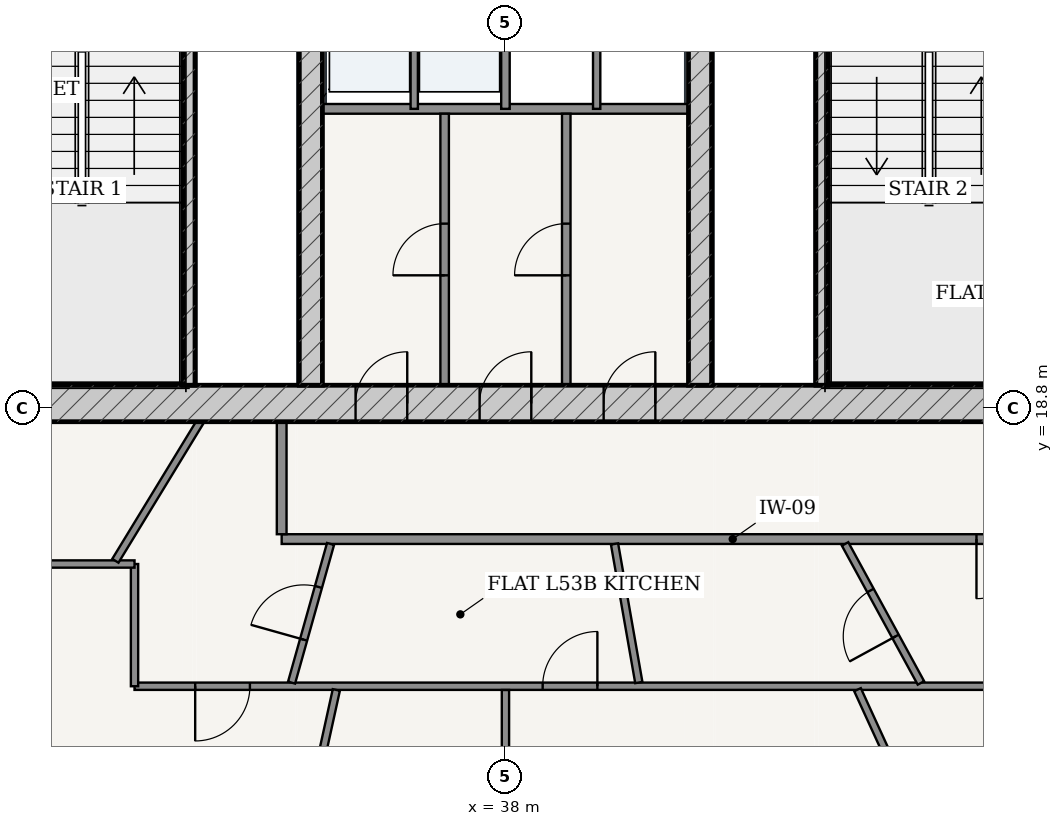
"""IFC4 building model, lengths in metres.
Left out: names, types, materials, properties, quantities, classifications, styles, units other than length and angle.
Written with IfcOpenShell. Run it as: python <this file> out.ifc"""

import sys

from ifc_helpers import new_model, si_unit, direction, frame, frame_2d, origin, place, context, subcontext, project, spatial, rectangle, extrude, source, transform, mapped, element, fill, save


model = new_model("IFC4")
c1 = context("Model", 3, precision=1e-05, world=origin(), true_north=direction((-0.2419218956, 0.970295726276)))
c2 = subcontext(c1, "Body", "Model", "MODEL_VIEW")
j1 = project(units=[si_unit("LENGTHUNIT", "METRE"), si_unit("PLANEANGLEUNIT", "RADIAN")], contexts=[c1])
p1 = place(None, origin())
s1 = spatial("IfcSite", under=j1, at=p1, CompositionType="ELEMENT")
p2 = place(p1, origin())
s2 = spatial("IfcBuilding", under=s1, at=p2, CompositionType="ELEMENT")
p3 = place(p2, frame((0.0, 0.0, 202.3)))
s3 = spatial("IfcBuildingStorey", under=s2, at=p3, CompositionType="ELEMENT", Elevation=202.3)
p4 = place(p3, frame((28.775, 18.875, 0.0), z_axis=(0.0, 0.0, 1.0), x_axis=(1.0, 0.0, 0.0)))
e1 = element("IfcWall", 1, at=p4, inside=s3, PredefinedType="SHEAR", context=c2, shape_type="SweptSolid", body=[
    extrude(rectangle(XDim=18.45, YDim=0.6, at=frame_2d((9.225, 0.0))), origin(), (0.0, 0.0, 1.0), 3.435),
])
p5 = place(p4, frame((6.76, 0.0, 0.0)))
e2 = element("IfcOpeningElement", 2, at=p5, cuts=e1, PredefinedType="OPENING", context=c2, shape_type="SweptSolid", body=[
    extrude(rectangle(XDim=0.85, YDim=2.1, at=frame_2d((0.425, 1.05))), frame((0.0, 0.31, 0.0), z_axis=(0.0, -1.0, 0.0), x_axis=(1.0, 0.0, 0.0)), (0.0, 0.0, 1.0), 0.62),
])
p6 = place(p4, frame((8.8, 0.0, 0.0)))
e3 = element("IfcOpeningElement", 3, at=p6, cuts=e1, PredefinedType="OPENING", context=c2, shape_type="SweptSolid", body=[
    extrude(rectangle(XDim=0.85, YDim=2.1, at=frame_2d((0.425, 1.05))), frame((0.0, 0.31, 0.0), z_axis=(0.0, -1.0, 0.0), x_axis=(1.0, 0.0, 0.0)), (0.0, 0.0, 1.0), 0.62),
])
p7 = place(p4, frame((10.84, 0.0, 0.0)))
e4 = element("IfcOpeningElement", 4, at=p7, cuts=e1, PredefinedType="OPENING", context=c2, shape_type="SweptSolid", body=[
    extrude(rectangle(XDim=0.85, YDim=2.1, at=frame_2d((0.425, 1.05))), frame((0.0, 0.31, 0.0), z_axis=(0.0, -1.0, 0.0), x_axis=(1.0, 0.0, 0.0)), (0.0, 0.0, 1.0), 0.62),
])
for number, where, z_axis, x_axis in (
    (5, (32.795, 19.175, 0.0), (0.0, 0.0, 1.0), (0.0, 1.0, 0.0)),
    (6, (43.205, 19.175, 0.0), (0.0, 0.0, 1.0), (0.0, 1.0, 0.0)),
):
    element("IfcWall", number, at=place(p3, frame(where, z_axis=z_axis, x_axis=x_axis)), inside=s3, PredefinedType="SOLIDWALL", context=c2, shape_type="SweptSolid", body=[
        extrude(rectangle(XDim=7.375, YDim=0.2, at=frame_2d((3.688, 0.0))), origin(), (0.0, 0.0, 1.0), 3.435),
    ])
p8 = place(p3, frame((34.8, 19.175, 0.0), z_axis=(0.0, 0.0, 1.0), x_axis=(0.0, 1.0, 0.0)))
e7 = element("IfcWall", 7, at=p8, inside=s3, PredefinedType="SHEAR", context=c2, shape_type="SweptSolid", body=[
    extrude(rectangle(XDim=15.25, YDim=0.38, at=frame_2d((7.625, 0.0))), origin(), (0.0, 0.0, 1.0), 3.435),
])
p9 = place(p8, frame((7.8, 0.0, 0.0)))
e8 = element("IfcOpeningElement", 8, at=p9, cuts=e7, PredefinedType="OPENING", context=c2, shape_type="SweptSolid", body=[
    extrude(rectangle(XDim=1.05, YDim=2.15, at=frame_2d((0.525, 1.075))), frame((0.0, 0.2, 0.0), z_axis=(0.0, -1.0, 0.0), x_axis=(1.0, 0.0, 0.0)), (0.0, 0.0, 1.0), 0.4),
])
p10 = place(p3, frame((41.2, 19.175, 0.0), z_axis=(0.0, 0.0, 1.0), x_axis=(0.0, 1.0, 0.0)))
e9 = element("IfcWall", 9, at=p10, inside=s3, PredefinedType="SHEAR", context=c2, shape_type="SweptSolid", body=[
    extrude(rectangle(XDim=15.25, YDim=0.38, at=frame_2d((7.625, 0.0))), origin(), (0.0, 0.0, 1.0), 3.435),
])
p11 = place(p10, frame((7.8, 0.0, 0.0)))
e10 = element("IfcOpeningElement", 10, at=p11, cuts=e9, PredefinedType="OPENING", context=c2, shape_type="SweptSolid", body=[
    extrude(rectangle(XDim=1.05, YDim=2.15, at=frame_2d((0.525, 1.075))), frame((0.0, 0.2, 0.0), z_axis=(0.0, -1.0, 0.0), x_axis=(1.0, 0.0, 0.0)), (0.0, 0.0, 1.0), 0.4),
])
p12 = place(p3, frame((34.99, 23.72, 0.0), z_axis=(0.0, 0.0, 1.0), x_axis=(1.0, 0.0, 0.0)))
e11 = element("IfcWall", 11, at=p12, inside=s3, PredefinedType="PARTITIONING", context=c2, shape_type="SweptSolid", body=[
    extrude(rectangle(XDim=6.02, YDim=0.16, at=frame_2d((3.01, 0.0))), origin(), (0.0, 0.0, 1.0), 3.435),
])
p13 = place(p3, frame((36.5, 23.72, 0.0), z_axis=(0.0, 0.0, 1.0), x_axis=(0.0, 1.0, 0.0)))
e12 = element("IfcWall", 12, at=p13, inside=s3, PredefinedType="PARTITIONING", context=c2, shape_type="SweptSolid", body=[
    extrude(rectangle(XDim=2.56, YDim=0.12, at=frame_2d((1.28, 0.0))), origin(), (0.0, 0.0, 1.0), 3.435),
])
p14 = place(p3, frame((38.0, 23.72, 0.0), z_axis=(0.0, 0.0, 1.0), x_axis=(0.0, 1.0, 0.0)))
e13 = element("IfcWall", 13, at=p14, inside=s3, PredefinedType="PARTITIONING", context=c2, shape_type="SweptSolid", body=[
    extrude(rectangle(XDim=2.56, YDim=0.14, at=frame_2d((1.28, 0.0))), origin(), (0.0, 0.0, 1.0), 3.435),
])
p15 = place(p3, frame((39.5, 23.72, 0.0), z_axis=(0.0, 0.0, 1.0), x_axis=(0.0, 1.0, 0.0)))
e14 = element("IfcWall", 14, at=p15, inside=s3, PredefinedType="PARTITIONING", context=c2, shape_type="SweptSolid", body=[
    extrude(rectangle(XDim=2.56, YDim=0.12, at=frame_2d((1.28, 0.0))), origin(), (0.0, 0.0, 1.0), 3.435),
])
p16 = place(p3, frame((37.0, 19.175, 0.0), z_axis=(0.0, 0.0, 1.0), x_axis=(0.0, 1.0, 0.0)))
e15 = element("IfcWall", 15, at=p16, inside=s3, PredefinedType="PARTITIONING", context=c2, shape_type="SweptSolid", body=[
    extrude(rectangle(XDim=4.465, YDim=0.14, at=frame_2d((2.232, 0.0))), origin(), (0.0, 0.0, 1.0), 3.435),
])
p17 = place(p16, frame((1.808, 0.0, 0.0)))
e16 = element("IfcOpeningElement", 16, at=p17, cuts=e15, PredefinedType="OPENING", context=c2, shape_type="SweptSolid", body=[
    extrude(rectangle(XDim=0.85, YDim=2.1, at=frame_2d((0.425, 1.05))), frame((0.0, 0.08, 0.0), z_axis=(0.0, -1.0, 0.0), x_axis=(1.0, 0.0, 0.0)), (0.0, 0.0, 1.0), 0.16),
])
p18 = place(p3, frame((39.0, 19.175, 0.0), z_axis=(0.0, 0.0, 1.0), x_axis=(0.0, 1.0, 0.0)))
e17 = element("IfcWall", 17, at=p18, inside=s3, PredefinedType="PARTITIONING", context=c2, shape_type="SweptSolid", body=[
    extrude(rectangle(XDim=4.465, YDim=0.14, at=frame_2d((2.232, 0.0))), origin(), (0.0, 0.0, 1.0), 3.435),
])
p19 = place(p18, frame((1.808, 0.0, 0.0)))
e18 = element("IfcOpeningElement", 18, at=p19, cuts=e17, PredefinedType="OPENING", context=c2, shape_type="SweptSolid", body=[
    extrude(rectangle(XDim=0.85, YDim=2.1, at=frame_2d((0.425, 1.05))), frame((0.0, 0.08, 0.0), z_axis=(0.0, -1.0, 0.0), x_axis=(1.0, 0.0, 0.0)), (0.0, 0.0, 1.0), 0.16),
])
p20 = place(p3, frame((34.32, 16.645, 0.0), z_axis=(0.0, 0.0, 1.0), x_axis=(1.0, 0.0, 0.0)))
e19 = element("IfcWall", 19, at=p20, inside=s3, PredefinedType="PARTITIONING", context=c2, shape_type="SweptSolid", body=[
    extrude(rectangle(XDim=14.835, YDim=0.16, at=frame_2d((7.417, 0.0))), origin(), (0.0, 0.0, 1.0), 2.951),
])
p21 = place(p20, frame((11.426, 0.0, 0.0)))
e20 = element("IfcOpeningElement", 20, at=p21, cuts=e19, PredefinedType="OPENING", context=c2, shape_type="SweptSolid", body=[
    extrude(rectangle(XDim=0.98, YDim=2.2, at=frame_2d((0.49, 1.1))), frame((0.0, 0.09, 0.0), z_axis=(0.0, -1.0, 0.0), x_axis=(1.0, 0.0, 0.0)), (0.0, 0.0, 1.0), 0.18),
])
p22 = place(p3, frame((34.32, 16.725, 0.0), z_axis=(0.0, 0.0, 1.0), x_axis=(0.0, 1.0, 0.0)))
e21 = element("IfcWall", 21, at=p22, inside=s3, PredefinedType="PARTITIONING", context=c2, shape_type="SweptSolid", body=[
    extrude(rectangle(XDim=1.85, YDim=0.16, at=frame_2d((0.925, 0.0))), origin(), (0.0, 0.0, 1.0), 3.435),
])
p23 = place(p3, frame((51.575, 14.225, 0.0), z_axis=(0.0, 0.0, 1.0), x_axis=(-1.0, 0.0, 0.0)))
e22 = element("IfcWall", 22, at=p23, inside=s3, PredefinedType="PARTITIONING", context=c2, shape_type="SweptSolid", body=[
    extrude(rectangle(XDim=19.675, YDim=0.12, at=frame_2d((9.837, 0.0))), origin(), (0.0, 0.0, 1.0), 2.951),
])
p24 = place(p23, frame((3.083, 0.0, 0.0)))
e23 = element("IfcOpeningElement", 23, at=p24, cuts=e22, PredefinedType="OPENING", context=c2, shape_type="SweptSolid", body=[
    extrude(rectangle(XDim=0.9, YDim=2.15, at=frame_2d((0.45, 1.075))), frame((0.0, 0.07, 0.0), z_axis=(0.0, -1.0, 0.0), x_axis=(1.0, 0.0, 0.0)), (0.0, 0.0, 1.0), 0.14),
])
p25 = place(p23, frame((12.063, 0.0, 0.0)))
e24 = element("IfcOpeningElement", 24, at=p25, cuts=e22, PredefinedType="OPENING", context=c2, shape_type="SweptSolid", body=[
    extrude(rectangle(XDim=0.9, YDim=2.15, at=frame_2d((0.45, 1.075))), frame((0.0, 0.07, 0.0), z_axis=(0.0, -1.0, 0.0), x_axis=(1.0, 0.0, 0.0)), (0.0, 0.0, 1.0), 0.14),
])
p26 = place(p23, frame((17.777, 0.0, 0.0)))
e25 = element("IfcOpeningElement", 25, at=p26, cuts=e22, PredefinedType="OPENING", context=c2, shape_type="SweptSolid", body=[
    extrude(rectangle(XDim=0.9, YDim=2.15, at=frame_2d((0.45, 1.075))), frame((0.0, 0.07, 0.0), z_axis=(0.0, -1.0, 0.0), x_axis=(1.0, 0.0, 0.0)), (0.0, 0.0, 1.0), 0.14),
])
p27 = place(p3, frame((31.9, 14.225, 0.0), z_axis=(0.0, 0.0, 1.0), x_axis=(0.0, 1.0, 0.0)))
e26 = element("IfcWall", 26, at=p27, inside=s3, PredefinedType="PARTITIONING", context=c2, shape_type="SweptSolid", body=[
    extrude(rectangle(XDim=2.01, YDim=0.12, at=frame_2d((1.005, 0.0))), origin(), (0.0, 0.0, 1.0), 3.11),
])
p28 = place(p3, frame((31.9, 16.235, 0.0), z_axis=(0.0, 0.0, 1.0), x_axis=(-1.0, 0.0, 0.0)))
e27 = element("IfcWall", 27, at=p28, inside=s3, PredefinedType="PARTITIONING", context=c2, shape_type="SweptSolid", body=[
    extrude(rectangle(XDim=5.465, YDim=0.12, at=frame_2d((2.732, 0.0))), origin(), (0.0, 0.0, 1.0), 2.951),
])
p29 = place(p28, frame((2.979, 0.0, 0.0)))
e28 = element("IfcOpeningElement", 28, at=p29, cuts=e27, PredefinedType="OPENING", context=c2, shape_type="SweptSolid", body=[
    extrude(rectangle(XDim=0.9, YDim=2.15, at=frame_2d((0.45, 1.075))), frame((0.0, 0.07, 0.0), z_axis=(0.0, -1.0, 0.0), x_axis=(1.0, 0.0, 0.0)), (0.0, 0.0, 1.0), 0.14),
])
p30 = place(p3, frame((35.219, 14.165, 0.0), z_axis=(0.0, 0.0, 1.0), x_axis=(-0.214959845337, -0.976622887758, 0.0)))
e29 = element("IfcWall", 29, at=p30, inside=s3, PredefinedType="PARTITIONING", context=c2, shape_type="SweptSolid", body=[
    extrude(rectangle(XDim=6.744, YDim=0.12, at=frame_2d((3.372, 0.0))), origin(), (0.0, 0.0, 1.0), 2.951),
])
p31 = place(p3, frame((38.0, 14.163, 0.0), z_axis=(0.0, 0.0, 1.0), x_axis=(0.0, -1.0, 0.0)))
e30 = element("IfcWall", 30, at=p31, inside=s3, PredefinedType="PARTITIONING", context=c2, shape_type="SweptSolid", body=[
    extrude(rectangle(XDim=7.003, YDim=0.12, at=frame_2d((3.501, 0.0))), origin(), (0.0, 0.0, 1.0), 2.951),
])
p32 = place(p31, frame((3.052, 0.0, 0.0)))
e31 = element("IfcOpeningElement", 31, at=p32, cuts=e30, PredefinedType="OPENING", context=c2, shape_type="SweptSolid", body=[
    extrude(rectangle(XDim=0.9, YDim=2.15, at=frame_2d((0.45, 1.075))), frame((0.0, 0.07, 0.0), z_axis=(0.0, -1.0, 0.0), x_axis=(1.0, 0.0, 0.0)), (0.0, 0.0, 1.0), 0.14),
])
p33 = place(p3, frame((43.79, 14.169, 0.0), z_axis=(0.0, 0.0, 1.0), x_axis=(0.416687974363, -0.909049576218, 0.0)))
e32 = element("IfcWall", 32, at=p33, inside=s3, PredefinedType="PARTITIONING", context=c2, shape_type="SweptSolid", body=[
    extrude(rectangle(XDim=6.065, YDim=0.12, at=frame_2d((3.033, 0.0))), origin(), (0.0, 0.0, 1.0), 2.951),
])
p34 = place(p33, frame((2.583, 0.0, 0.0)))
e33 = element("IfcOpeningElement", 33, at=p34, cuts=e32, PredefinedType="OPENING", context=c2, shape_type="SweptSolid", body=[
    extrude(rectangle(XDim=0.9, YDim=2.15, at=frame_2d((0.45, 1.075))), frame((0.0, 0.07, 0.0), z_axis=(0.0, -1.0, 0.0), x_axis=(1.0, 0.0, 0.0)), (0.0, 0.0, 1.0), 0.14),
])
p35 = place(p3, frame((32.981, 18.575, 0.0), z_axis=(0.0, 0.0, 1.0), x_axis=(-0.520926540997, -0.853601510592, 0.0)))
e34 = element("IfcWall", 34, at=p35, inside=s3, PredefinedType="PARTITIONING", context=c2, shape_type="SweptSolid", body=[
    extrude(rectangle(XDim=2.679, YDim=0.12, at=frame_2d((1.34, 0.0))), origin(), (0.0, 0.0, 1.0), 3.435),
])
p36 = place(p3, frame((35.124, 16.565, 0.0), z_axis=(0.0, 0.0, 1.0), x_axis=(-0.270566477163, -0.962701293982, 0.0)))
e35 = element("IfcWall", 35, at=p36, inside=s3, PredefinedType="PARTITIONING", context=c2, shape_type="SweptSolid", body=[
    extrude(rectangle(XDim=2.369, YDim=0.12, at=frame_2d((1.184, 0.0))), origin(), (0.0, 0.0, 1.0), 3.435),
])
p37 = place(p36, frame((0.734, 0.0, 0.0)))
e36 = element("IfcOpeningElement", 36, at=p37, cuts=e35, PredefinedType="OPENING", context=c2, shape_type="SweptSolid", body=[
    extrude(rectangle(XDim=0.9, YDim=2.15, at=frame_2d((0.45, 1.075))), frame((0.0, 0.07, 0.0), z_axis=(0.0, -1.0, 0.0), x_axis=(1.0, 0.0, 0.0)), (0.0, 0.0, 1.0), 0.14),
])
p38 = place(p3, frame((39.794, 16.565, 0.0), z_axis=(0.0, 0.0, 1.0), x_axis=(0.172641422295, -0.984984740647, 0.0)))
e37 = element("IfcWall", 37, at=p38, inside=s3, PredefinedType="PARTITIONING", context=c2, shape_type="SweptSolid", body=[
    extrude(rectangle(XDim=2.313, YDim=0.12, at=frame_2d((1.157, 0.0))), origin(), (0.0, 0.0, 1.0), 3.435),
])
p39 = place(p3, frame((43.585, 16.565, 0.0), z_axis=(0.0, 0.0, 1.0), x_axis=(0.479068920965, -0.877777288932, 0.0)))
e38 = element("IfcWall", 38, at=p39, inside=s3, PredefinedType="PARTITIONING", context=c2, shape_type="SweptSolid", body=[
    extrude(rectangle(XDim=2.604, YDim=0.12, at=frame_2d((1.302, 0.0))), origin(), (0.0, 0.0, 1.0), 3.11),
])
p40 = place(p39, frame((0.872, 0.0, 0.0)))
e39 = element("IfcOpeningElement", 39, at=p40, cuts=e38, PredefinedType="OPENING", context=c2, shape_type="SweptSolid", body=[
    extrude(rectangle(XDim=0.86, YDim=2.15, at=frame_2d((0.43, 1.075))), frame((0.0, 0.07, 0.0), z_axis=(0.0, -1.0, 0.0), x_axis=(1.0, 0.0, 0.0)), (0.0, 0.0, 1.0), 0.14),
])
m1 = source(origin(), c2, "Body", "SweptSolid", [
    extrude(rectangle(XDim=0.85, YDim=2.1, at=frame_2d((0.425, 1.05))), frame((0.0, 0.025, 0.0), z_axis=(0.0, -1.0, 0.0), x_axis=(1.0, 0.0, 0.0)), (0.0, 0.0, 1.0), 0.05),
])
p41 = place(p5, origin())
e40 = element("IfcDoor", 40, at=p41, inside=s3, OperationType="SINGLE_SWING_RIGHT", PredefinedType="DOOR", context=c2, shape_type="MappedRepresentation", body=[
    mapped(m1, transform((0.0, 0.0, 0.0), scale=1.0)),
])
fill(e2, e40)
p42 = place(p6, origin())
e41 = element("IfcDoor", 41, at=p42, inside=s3, OperationType="SINGLE_SWING_RIGHT", PredefinedType="DOOR", context=c2, shape_type="MappedRepresentation", body=[
    mapped(m1, transform((0.0, 0.0, 0.0), scale=1.0)),
])
fill(e3, e41)
p43 = place(p7, origin())
e42 = element("IfcDoor", 42, at=p43, inside=s3, OperationType="SINGLE_SWING_RIGHT", PredefinedType="DOOR", context=c2, shape_type="MappedRepresentation", body=[
    mapped(m1, transform((0.0, 0.0, 0.0), scale=1.0)),
])
fill(e4, e42)
p44 = place(p17, origin())
e43 = element("IfcDoor", 43, at=p44, inside=s3, OperationType="SINGLE_SWING_LEFT", PredefinedType="DOOR", context=c2, shape_type="MappedRepresentation", body=[
    mapped(m1, transform((0.0, 0.0, 0.0), scale=1.0)),
])
fill(e16, e43)
p45 = place(p19, origin())
e44 = element("IfcDoor", 44, at=p45, inside=s3, OperationType="SINGLE_SWING_LEFT", PredefinedType="DOOR", context=c2, shape_type="MappedRepresentation", body=[
    mapped(m1, transform((0.0, 0.0, 0.0), scale=1.0)),
])
fill(e18, e44)
m2 = source(origin(), c2, "Body", "SweptSolid", [
    extrude(rectangle(XDim=0.98, YDim=2.2, at=frame_2d((0.49, 1.1))), frame((0.0, 0.025, 0.0), z_axis=(0.0, -1.0, 0.0), x_axis=(1.0, 0.0, 0.0)), (0.0, 0.0, 1.0), 0.05),
])
p46 = place(p21, frame((0.98, 0.0, 0.0), z_axis=(0.0, 0.0, 1.0), x_axis=(-1.0, 0.0, 0.0)))
e45 = element("IfcDoor", 45, at=p46, inside=s3, OperationType="SINGLE_SWING_RIGHT", PredefinedType="DOOR", context=c2, shape_type="MappedRepresentation", body=[
    mapped(m2, transform((0.0, 0.0, 0.0), scale=1.0)),
])
fill(e20, e45)
m3 = source(origin(), c2, "Body", "SweptSolid", [
    extrude(rectangle(XDim=0.86, YDim=2.15, at=frame_2d((0.43, 1.075))), frame((0.0, 0.025, 0.0), z_axis=(0.0, -1.0, 0.0), x_axis=(1.0, 0.0, 0.0)), (0.0, 0.0, 1.0), 0.05),
])
p47 = place(p40, frame((0.86, 0.0, 0.0), z_axis=(0.0, 0.0, 1.0), x_axis=(-1.0, 0.0, 0.0)))
e46 = element("IfcDoor", 46, at=p47, inside=s3, OperationType="SINGLE_SWING_LEFT", PredefinedType="DOOR", context=c2, shape_type="MappedRepresentation", body=[
    mapped(m3, transform((0.0, 0.0, 0.0), scale=1.0)),
])
fill(e39, e46)
m4 = source(origin(), c2, "Body", "SweptSolid", [
    extrude(rectangle(XDim=0.9, YDim=2.15, at=frame_2d((0.45, 1.075))), frame((0.0, 0.025, 0.0), z_axis=(0.0, -1.0, 0.0), x_axis=(1.0, 0.0, 0.0)), (0.0, 0.0, 1.0), 0.05),
])
p48 = place(p25, frame((0.9, 0.0, 0.0), z_axis=(0.0, 0.0, 1.0), x_axis=(-1.0, 0.0, 0.0)))
e47 = element("IfcDoor", 47, at=p48, inside=s3, OperationType="SINGLE_SWING_RIGHT", PredefinedType="DOOR", context=c2, shape_type="MappedRepresentation", body=[
    mapped(m4, transform((0.0, 0.0, 0.0), scale=1.0)),
])
fill(e24, e47)
p49 = place(p37, frame((0.9, 0.0, 0.0), z_axis=(0.0, 0.0, 1.0), x_axis=(-1.0, 0.0, 0.0)))
e48 = element("IfcDoor", 48, at=p49, inside=s3, OperationType="SINGLE_SWING_LEFT", PredefinedType="DOOR", context=c2, shape_type="MappedRepresentation", body=[
    mapped(m4, transform((0.0, 0.0, 0.0), scale=1.0)),
])
fill(e36, e48)
p50 = place(p26, origin())
e49 = element("IfcDoor", 49, at=p50, inside=s3, OperationType="SINGLE_SWING_RIGHT", PredefinedType="DOOR", context=c2, shape_type="MappedRepresentation", body=[
    mapped(m4, transform((0.0, 0.0, 0.0), scale=1.0)),
])
fill(e25, e49)
save(model, sys.argv[1])
